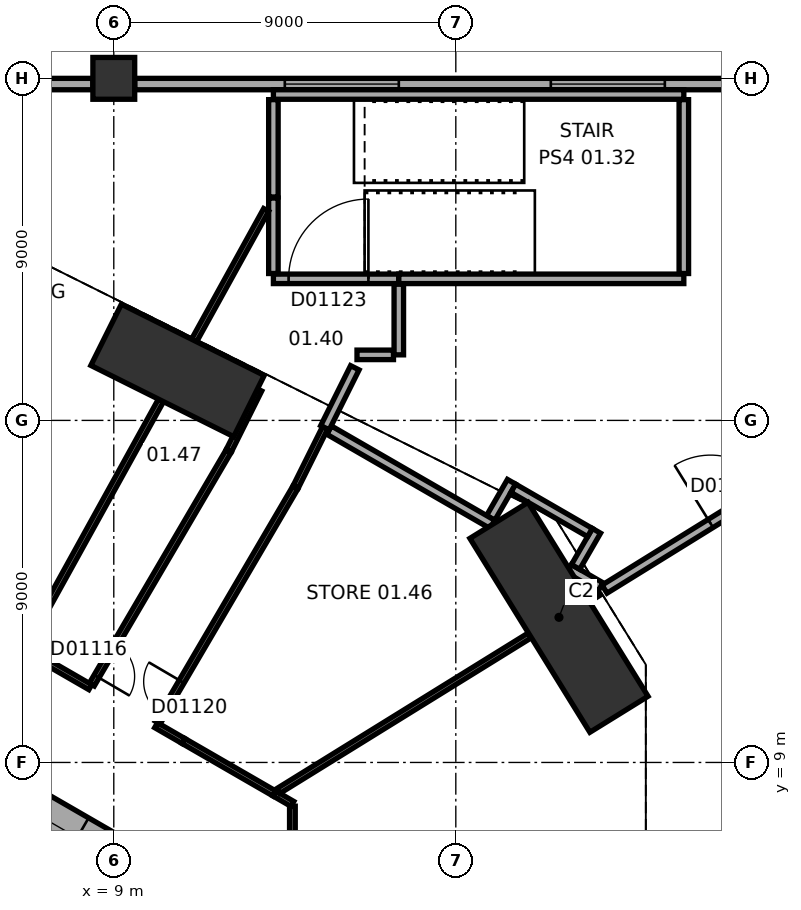
"""IFC4 building model, lengths in metres.
Left out: names, types, materials, properties, quantities, classifications, styles, units other than length and angle.
Written with IfcOpenShell. Run it as: python <this file> out.ifc"""

import sys

from ifc_helpers import new_model, si_unit, direction, frame, frame_2d, origin, origin_2d, place, context, subcontext, project, spatial, rectangle, extrude, element, fill, save


model = new_model("IFC4")
c1 = context("Model", 3, precision=1e-05, world=origin(), true_north=direction((0.0, 1.0)))
c2 = subcontext(c1, "Body", "Model", "MODEL_VIEW")
j1 = project(units=[si_unit("LENGTHUNIT", "METRE"), si_unit("PLANEANGLEUNIT", "RADIAN")], contexts=[c1])
p1 = place(None, origin())
s1 = spatial("IfcSite", under=j1, at=p1, CompositionType="ELEMENT")
p2 = place(p1, origin())
s2 = spatial("IfcBuilding", under=s1, at=p2, CompositionType="ELEMENT")
p3 = place(p2, frame((0.0, 0.0, 7.5)))
s3 = spatial("IfcBuildingStorey", under=s2, at=p3, CompositionType="ELEMENT", Elevation=7.5)
p4 = place(p3, frame((20.714, 12.818, 0.0), z_axis=(0.0, 0.0, 1.0), x_axis=(-0.526210955359, 0.850354061823, 0.0)))
e1 = element("IfcColumn", 1, at=p4, inside=s3, PredefinedType="COLUMN", context=c2, shape_type="SweptSolid", body=[
    extrude(rectangle(XDim=6.0, YDim=1.8, at=origin_2d()), origin(), (0.0, 0.0, 1.0), 5.5),
])
p5 = place(p3, frame((10.677, 19.315, 0.0), z_axis=(0.0, 0.0, 1.0), x_axis=(-0.894935140363, 0.446196251154, 0.0)))
e2 = element("IfcColumn", 2, at=p5, inside=s3, PredefinedType="COLUMN", context=c2, shape_type="SweptSolid", body=[
    extrude(rectangle(XDim=4.2, YDim=1.8, at=origin_2d()), origin(), (0.0, 0.0, 1.0), 5.5),
])
p6 = place(p3, frame((9.0, 27.0, 0.0), z_axis=(0.0, 0.0, 1.0), x_axis=(1.0, 0.0, 0.0)))
e3 = element("IfcColumn", 3, at=p6, inside=s3, PredefinedType="COLUMN", context=c2, shape_type="SweptSolid", body=[
    extrude(rectangle(XDim=1.1, YDim=1.1, at=origin_2d()), origin(), (0.0, 0.0, 1.0), 5.5),
])
p7 = place(p3, frame((10.4, 5.658, 0.0), z_axis=(0.0, 0.0, 1.0), x_axis=(-0.866021384402, 0.500006961711, 0.0)))
e4 = element("IfcWall", 4, at=p7, inside=s3, PredefinedType="SHEAR", context=c2, shape_type="SweptSolid", body=[
    extrude(rectangle(XDim=12.355, YDim=1.2, at=frame_2d((6.178, 0.0))), origin(), (0.0, 0.0, 1.0), 5.5),
])
p8 = place(p7, frame((2.728, 0.0, 0.0)))
e5 = element("IfcOpeningElement", 5, at=p8, cuts=e4, PredefinedType="OPENING", context=c2, shape_type="SweptSolid", body=[
    extrude(rectangle(XDim=1.1, YDim=2.1, at=frame_2d((0.55, 1.05))), frame((0.0, 0.61, 0.0), z_axis=(0.0, -1.0, 0.0), x_axis=(1.0, 0.0, 0.0)), (0.0, 0.0, 1.0), 1.22),
])
p9 = place(p7, frame((5.328, 0.0, 0.0)))
e6 = element("IfcOpeningElement", 6, at=p9, cuts=e4, PredefinedType="OPENING", context=c2, shape_type="SweptSolid", body=[
    extrude(rectangle(XDim=1.1, YDim=2.1, at=frame_2d((0.55, 1.05))), frame((0.0, 0.61, 0.0), z_axis=(0.0, -1.0, 0.0), x_axis=(1.0, 0.0, 0.0)), (0.0, 0.0, 1.0), 1.22),
])
p10 = place(p7, frame((7.928, 0.0, 0.0)))
e7 = element("IfcOpeningElement", 7, at=p10, cuts=e4, PredefinedType="OPENING", context=c2, shape_type="SweptSolid", body=[
    extrude(rectangle(XDim=1.1, YDim=2.1, at=frame_2d((0.55, 1.05))), frame((0.0, 0.61, 0.0), z_axis=(0.0, -1.0, 0.0), x_axis=(1.0, 0.0, 0.0)), (0.0, 0.0, 1.0), 1.22),
])
p11 = place(p3, frame((26.45, 26.85, 0.0), z_axis=(0.0, 0.0, 1.0), x_axis=(-1.0, 0.0, 0.0)))
e8 = element("IfcWall", 8, at=p11, inside=s3, PredefinedType="STANDARD", context=c2, shape_type="SweptSolid", body=[
    extrude(rectangle(XDim=16.9, YDim=0.3, at=frame_2d((8.45, 0.0))), origin(), (0.0, 0.0, 1.0), 4.0),
])
p12 = place(p11, frame((2.95, 0.0, 1.0)))
e9 = element("IfcOpeningElement", 9, at=p12, cuts=e8, PredefinedType="OPENING", context=c2, shape_type="SweptSolid", body=[
    extrude(rectangle(XDim=3.0, YDim=2.6, at=frame_2d((1.5, 1.3))), frame((0.0, 0.16, 0.0), z_axis=(0.0, -1.0, 0.0), x_axis=(1.0, 0.0, 0.0)), (0.0, 0.0, 1.0), 0.32),
])
p13 = place(p11, frame((9.95, 0.0, 1.0)))
e10 = element("IfcOpeningElement", 10, at=p13, cuts=e8, PredefinedType="OPENING", context=c2, shape_type="SweptSolid", body=[
    extrude(rectangle(XDim=3.0, YDim=2.6, at=frame_2d((1.5, 1.3))), frame((0.0, 0.16, 0.0), z_axis=(0.0, -1.0, 0.0), x_axis=(1.0, 0.0, 0.0)), (0.0, 0.0, 1.0), 0.32),
])
p14 = place(p3, frame((8.45, 26.85, 0.0), z_axis=(0.0, 0.0, 1.0), x_axis=(-1.0, 0.0, 0.0)))
e11 = element("IfcWall", 11, at=p14, inside=s3, PredefinedType="STANDARD", context=c2, shape_type="SweptSolid", body=[
    extrude(rectangle(XDim=16.9, YDim=0.3, at=frame_2d((8.45, 0.0))), origin(), (0.0, 0.0, 1.0), 4.0),
])
p15 = place(p14, frame((2.45, 0.0, 1.0)))
e12 = element("IfcOpeningElement", 12, at=p15, cuts=e11, PredefinedType="OPENING", context=c2, shape_type="SweptSolid", body=[
    extrude(rectangle(XDim=3.0, YDim=2.6, at=frame_2d((1.5, 1.3))), frame((0.0, 0.16, 0.0), z_axis=(0.0, -1.0, 0.0), x_axis=(1.0, 0.0, 0.0)), (0.0, 0.0, 1.0), 0.32),
])
p16 = place(p14, frame((11.45, 0.0, 1.0)))
e13 = element("IfcOpeningElement", 13, at=p16, cuts=e11, PredefinedType="OPENING", context=c2, shape_type="SweptSolid", body=[
    extrude(rectangle(XDim=3.0, YDim=2.6, at=frame_2d((1.5, 1.3))), frame((0.0, 0.16, 0.0), z_axis=(0.0, -1.0, 0.0), x_axis=(1.0, 0.0, 0.0)), (0.0, 0.0, 1.0), 0.32),
])
p17 = place(p3, frame((7.424, 4.259, 0.0), z_axis=(0.0, 0.0, 1.0), x_axis=(-0.866026010844, 0.49999894854, 0.0)))
e14 = element("IfcWall", 14, at=p17, inside=s3, PredefinedType="PARTITIONING", context=c2, shape_type="SweptSolid", body=[
    extrude(rectangle(XDim=8.0, YDim=0.2, at=frame_2d((4.0, 0.0))), origin(), (0.0, 0.0, 1.0), 5.2),
])
p18 = place(p3, frame((13.7, 7.85, 0.0), z_axis=(0.0, 0.0, 1.0), x_axis=(0.0, -1.0, 0.0)))
e15 = element("IfcWall", 15, at=p18, inside=s3, PredefinedType="PARTITIONING", context=c2, shape_type="SweptSolid", body=[
    extrude(rectangle(XDim=7.187, YDim=0.15, at=frame_2d((3.594, 0.0))), origin(), (0.0, 0.0, 1.0), 5.2),
])
p19 = place(p3, frame((13.7, 7.909, 0.0), z_axis=(0.0, 0.0, 1.0), x_axis=(-0.865629350875, 0.50068535719, 0.0)))
e16 = element("IfcWall", 16, at=p19, inside=s3, PredefinedType="PARTITIONING", context=c2, shape_type="SweptSolid", body=[
    extrude(rectangle(XDim=0.549, YDim=0.15, at=frame_2d((0.274, 0.0))), origin(), (0.0, 0.0, 1.0), 5.2),
])
p20 = place(p3, frame((10.833, 9.564, 0.0), z_axis=(0.0, 0.0, 1.0), x_axis=(0.866091368387, -0.499885728548, 0.0)))
e17 = element("IfcWall", 17, at=p20, inside=s3, PredefinedType="PARTITIONING", context=c2, shape_type="SweptSolid", body=[
    extrude(rectangle(XDim=2.761, YDim=0.15, at=frame_2d((1.381, 0.0))), origin(), (0.0, 0.0, 1.0), 5.2),
])
p21 = place(p3, frame((10.114, 9.98, 0.0), z_axis=(0.0, 0.0, 1.0), x_axis=(0.865848115047, -0.500306947453, 0.0)))
e18 = element("IfcWall", 18, at=p21, inside=s3, PredefinedType="PARTITIONING", context=c2, shape_type="SweptSolid", body=[
    extrude(rectangle(XDim=0.832, YDim=0.15, at=frame_2d((0.416, 0.0))), origin(), (0.0, 0.0, 1.0), 5.2),
])
p22 = place(p3, frame((8.422, 11.05, 0.0), z_axis=(0.0, 0.0, 1.0), x_axis=(0.50561651199, 0.862758333952, 0.0)))
e19 = element("IfcWall", 19, at=p22, inside=s3, PredefinedType="PARTITIONING", context=c2, shape_type="SweptSolid", body=[
    extrude(rectangle(XDim=7.118, YDim=0.15, at=frame_2d((3.559, 0.0))), origin(), (0.0, 0.0, 1.0), 4.4),
])
p23 = place(p22, frame((0.25, 0.0, 0.0)))
e20 = element("IfcOpeningElement", 20, at=p23, cuts=e19, PredefinedType="OPENING", context=c2, shape_type="SweptSolid", body=[
    extrude(rectangle(XDim=1.0, YDim=2.1, at=frame_2d((0.5, 1.05))), frame((0.0, 0.085, 0.0), z_axis=(0.0, -1.0, 0.0), x_axis=(1.0, 0.0, 0.0)), (0.0, 0.0, 1.0), 0.17),
])
p24 = place(p3, frame((6.995, 11.781, 0.0), z_axis=(0.0, 0.0, 1.0), x_axis=(0.866076391369, -0.499911676512, 0.0)))
e21 = element("IfcWall", 21, at=p24, inside=s3, PredefinedType="PARTITIONING", context=c2, shape_type="SweptSolid", body=[
    extrude(rectangle(XDim=1.601, YDim=0.15, at=frame_2d((0.8, 0.0))), origin(), (0.0, 0.0, 1.0), 5.2),
])
p25 = place(p3, frame((6.668, 12.062, 0.0), z_axis=(0.0, 0.0, 1.0), x_axis=(0.483795376692, 0.875181143245, 0.0)))
e22 = element("IfcWall", 22, at=p25, inside=s3, PredefinedType="PARTITIONING", context=c2, shape_type="SweptSolid", body=[
    extrude(rectangle(XDim=7.387, YDim=0.15, at=frame_2d((3.693, 0.0))), origin(), (0.0, 0.0, 1.0), 5.2),
])
p26 = place(p3, frame((19.949, 12.345, 0.0), z_axis=(0.0, 0.0, 1.0), x_axis=(-0.850341306025, -0.526231568102, 0.0)))
e23 = element("IfcWall", 23, at=p26, inside=s3, PredefinedType="PARTITIONING", context=c2, shape_type="SweptSolid", body=[
    extrude(rectangle(XDim=7.787, YDim=0.15, at=frame_2d((3.894, 0.0))), origin(), (0.0, 0.0, 1.0), 5.2),
])
p27 = place(p3, frame((21.756, 13.463, 0.0), z_axis=(0.0, 0.0, 1.0), x_axis=(-0.850441528835, -0.526069582881, 0.0)))
e24 = element("IfcWall", 24, at=p27, inside=s3, PredefinedType="PARTITIONING", context=c2, shape_type="SweptSolid", body=[
    extrude(rectangle(XDim=0.324, YDim=0.15, at=frame_2d((0.162, 0.0))), origin(), (0.0, 0.0, 1.0), 5.2),
])
p28 = place(p3, frame((21.913, 13.56, 0.0), z_axis=(0.0, 0.0, 1.0), x_axis=(0.850358193604, 0.526204278367, 0.0)))
e25 = element("IfcWall", 25, at=p28, inside=s3, PredefinedType="SOLIDWALL", context=c2, shape_type="SweptSolid", body=[
    extrude(rectangle(XDim=5.982, YDim=0.25, at=frame_2d((2.991, 0.0))), origin(), (0.0, 0.0, 1.0), 5.2),
])
p29 = place(p28, frame((3.282, 0.0, 0.0)))
e26 = element("IfcOpeningElement", 26, at=p29, cuts=e25, PredefinedType="OPENING", context=c2, shape_type="SweptSolid", body=[
    extrude(rectangle(XDim=1.8, YDim=2.4, at=frame_2d((0.9, 1.2))), frame((0.0, 0.135, 0.0), z_axis=(0.0, -1.0, 0.0), x_axis=(1.0, 0.0, 0.0)), (0.0, 0.0, 1.0), 0.27),
])
p30 = place(p3, frame((20.981, 14.098, 0.0), z_axis=(0.0, 0.0, 1.0), x_axis=(0.866019818373, -0.500009674092, 0.0)))
e27 = element("IfcWall", 27, at=p30, inside=s3, PredefinedType="SOLIDWALL", context=c2, shape_type="SweptSolid", body=[
    extrude(rectangle(XDim=0.957, YDim=0.25, at=frame_2d((0.478, 0.0))), origin(), (0.0, 0.0, 1.0), 5.2),
])
p31 = place(p3, frame((21.151, 14.144, 0.0), z_axis=(0.0, 0.0, 1.0), x_axis=(0.499940538003, 0.866059731463, 0.0)))
e28 = element("IfcWall", 28, at=p31, inside=s3, PredefinedType="SOLIDWALL", context=c2, shape_type="SweptSolid", body=[
    extrude(rectangle(XDim=1.098, YDim=0.25, at=frame_2d((0.549, 0.0))), origin(), (0.0, 0.0, 1.0), 5.2),
])
p32 = place(p3, frame((18.918, 15.434, 0.0), z_axis=(0.0, 0.0, 1.0), x_axis=(0.500036802197, 0.866004154983, 0.0)))
e29 = element("IfcWall", 29, at=p32, inside=s3, PredefinedType="SOLIDWALL", context=c2, shape_type="SweptSolid", body=[
    extrude(rectangle(XDim=1.098, YDim=0.25, at=frame_2d((0.549, 0.0))), origin(), (0.0, 0.0, 1.0), 5.2),
])
p33 = place(p3, frame((19.513, 16.214, 0.0), z_axis=(0.0, 0.0, 1.0), x_axis=(0.865983097198, -0.500073269999, 0.0)))
e30 = element("IfcWall", 30, at=p33, inside=s3, PredefinedType="SOLIDWALL", context=c2, shape_type="SweptSolid", body=[
    extrude(rectangle(XDim=2.329, YDim=0.25, at=frame_2d((1.165, 0.0))), origin(), (0.0, 0.0, 1.0), 5.2),
])
p34 = place(p3, frame((13.772, 16.224, 0.0), z_axis=(0.0, 0.0, 1.0), x_axis=(-0.505547889018, -0.862798546539, 0.0)))
e31 = element("IfcWall", 31, at=p34, inside=s3, PredefinedType="PARTITIONING", context=c2, shape_type="SweptSolid", body=[
    extrude(rectangle(XDim=7.156, YDim=0.15, at=frame_2d((3.578, 0.0))), origin(), (0.0, 0.0, 1.0), 5.2),
])
p35 = place(p34, frame((5.906, 0.0, 0.0)))
e32 = element("IfcOpeningElement", 32, at=p35, cuts=e31, PredefinedType="OPENING", context=c2, shape_type="SweptSolid", body=[
    extrude(rectangle(XDim=1.0, YDim=2.1, at=frame_2d((0.5, 1.05))), frame((0.0, 0.085, 0.0), z_axis=(0.0, -1.0, 0.0), x_axis=(1.0, 0.0, 0.0)), (0.0, 0.0, 1.0), 0.17),
])
p36 = place(p3, frame((14.665, 17.745, 0.0), z_axis=(0.0, 0.0, 1.0), x_axis=(0.865991457592, -0.50005879192, 0.0)))
e33 = element("IfcWall", 33, at=p36, inside=s3, PredefinedType="SOLIDWALL", context=c2, shape_type="SweptSolid", body=[
    extrude(rectangle(XDim=4.964, YDim=0.25, at=frame_2d((2.482, 0.0))), origin(), (0.0, 0.0, 1.0), 3.7),
])
p37 = place(p3, frame((14.56, 17.803, 0.0), z_axis=(0.0, 0.0, 1.0), x_axis=(-0.44574598187, -0.895159493971, 0.0)))
e34 = element("IfcWall", 34, at=p37, inside=s3, PredefinedType="PARTITIONING", context=c2, shape_type="SweptSolid", body=[
    extrude(rectangle(XDim=1.731, YDim=0.15, at=frame_2d((0.865, 0.0))), origin(), (0.0, 0.0, 1.0), 5.2),
])
p38 = place(p3, frame((14.556, 17.807, 0.0), z_axis=(0.0, 0.0, 1.0), x_axis=(0.446105260408, 0.894980500701, 0.0)))
e35 = element("IfcWall", 35, at=p38, inside=s3, PredefinedType="SOLIDWALL", context=c2, shape_type="SweptSolid", body=[
    extrude(rectangle(XDim=1.763, YDim=0.25, at=frame_2d((0.881, 0.0))), origin(), (0.0, 0.0, 1.0), 5.2),
])
p39 = place(p3, frame((12.825, 18.807, 0.0), z_axis=(0.0, 0.0, 1.0), x_axis=(-0.445626254489, -0.895219102404, 0.0)))
e36 = element("IfcWall", 36, at=p39, inside=s3, PredefinedType="PARTITIONING", context=c2, shape_type="SweptSolid", body=[
    extrude(rectangle(XDim=1.785, YDim=0.15, at=frame_2d((0.893, 0.0))), origin(), (0.0, 0.0, 1.0), 5.2),
])
p40 = place(p3, frame((16.36, 19.725, 0.0), z_axis=(0.0, 0.0, 1.0), x_axis=(-1.0, 0.0, 0.0)))
e37 = element("IfcWall", 37, at=p40, inside=s3, PredefinedType="SOLIDWALL", context=c2, shape_type="SweptSolid", body=[
    extrude(rectangle(XDim=0.96, YDim=0.25, at=frame_2d((0.48, 0.0))), origin(), (0.0, 0.0, 1.0), 5.2),
])
p41 = place(p3, frame((16.5, 21.585, 0.0), z_axis=(0.0, 0.0, 1.0), x_axis=(0.0, -1.0, 0.0)))
e38 = element("IfcWall", 38, at=p41, inside=s3, PredefinedType="SOLIDWALL", context=c2, shape_type="SweptSolid", body=[
    extrude(rectangle(XDim=1.86, YDim=0.25, at=frame_2d((0.93, 0.0))), origin(), (0.0, 0.0, 1.0), 5.2),
])
p42 = place(p3, frame((16.499, 21.725, 0.0), z_axis=(0.0, 0.0, 1.0), x_axis=(-1.0, 0.0, 0.0)))
e39 = element("IfcWall", 39, at=p42, inside=s3, PredefinedType="SOLIDWALL", context=c2, shape_type="SweptSolid", body=[
    extrude(rectangle(XDim=3.299, YDim=0.25, at=frame_2d((1.649, 0.0))), origin(), (0.0, 0.0, 1.0), 5.2),
])
p43 = place(p42, frame((0.799, 0.0, 0.0)))
e40 = element("IfcOpeningElement", 40, at=p43, cuts=e39, PredefinedType="OPENING", context=c2, shape_type="SweptSolid", body=[
    extrude(rectangle(XDim=2.1, YDim=2.4, at=frame_2d((1.05, 1.2))), frame((0.0, 0.135, 0.0), z_axis=(0.0, -1.0, 0.0), x_axis=(1.0, 0.0, 0.0)), (0.0, 0.0, 1.0), 0.27),
])
p44 = place(p3, frame((24.0, 21.725, 0.0), z_axis=(0.0, 0.0, 1.0), x_axis=(-1.0, 0.0, 0.0)))
e41 = element("IfcWall", 41, at=p44, inside=s3, PredefinedType="SOLIDWALL", context=c2, shape_type="SweptSolid", body=[
    extrude(rectangle(XDim=7.5, YDim=0.25, at=frame_2d((3.75, 0.0))), origin(), (0.0, 0.0, 1.0), 5.2),
])
p45 = place(p3, frame((13.2, 21.865, 0.0), z_axis=(0.0, 0.0, 1.0), x_axis=(0.0, 1.0, 0.0)))
e42 = element("IfcWall", 42, at=p45, inside=s3, PredefinedType="SOLIDWALL", context=c2, shape_type="SweptSolid", body=[
    extrude(rectangle(XDim=1.986, YDim=0.25, at=frame_2d((0.993, 0.0))), origin(), (0.0, 0.0, 1.0), 5.2),
])
p46 = place(p3, frame((13.01, 23.538, 0.0), z_axis=(0.0, 0.0, 1.0), x_axis=(-0.483449030978, -0.875372511818, 0.0)))
e43 = element("IfcWall", 43, at=p46, inside=s3, PredefinedType="PARTITIONING", context=c2, shape_type="SweptSolid", body=[
    extrude(rectangle(XDim=3.924, YDim=0.15, at=frame_2d((1.962, 0.0))), origin(), (0.0, 0.0, 1.0), 5.2),
])
p47 = place(p3, frame((13.2, 23.878, 0.0), z_axis=(0.0, 0.0, 1.0), x_axis=(0.0, 1.0, 0.0)))
e44 = element("IfcWall", 44, at=p47, inside=s3, PredefinedType="SOLIDWALL", context=c2, shape_type="SweptSolid", body=[
    extrude(rectangle(XDim=2.562, YDim=0.25, at=frame_2d((1.281, 0.0))), origin(), (0.0, 0.0, 1.0), 5.2),
])
p48 = place(p3, frame((24.0, 26.44, 0.0), z_axis=(0.0, 0.0, 1.0), x_axis=(0.0, -1.0, 0.0)))
e45 = element("IfcWall", 45, at=p48, inside=s3, PredefinedType="SOLIDWALL", context=c2, shape_type="SweptSolid", body=[
    extrude(rectangle(XDim=4.575, YDim=0.25, at=frame_2d((2.288, 0.0))), origin(), (0.0, 0.0, 1.0), 5.2),
])
p49 = place(p3, frame((24.0, 26.575, 0.0), z_axis=(0.0, 0.0, 1.0), x_axis=(-1.0, 0.0, 0.0)))
e46 = element("IfcWall", 46, at=p49, inside=s3, PredefinedType="SOLIDWALL", context=c2, shape_type="SweptSolid", body=[
    extrude(rectangle(XDim=10.8, YDim=0.25, at=frame_2d((5.4, 0.0))), origin(), (0.0, 0.0, 1.0), 5.2),
])
p50 = place(p12, origin())
e47 = element("IfcWindow", 47, at=p50, inside=s3, PartitioningType="SINGLE_PANEL", PredefinedType="WINDOW", context=c2, shape_type="SweptSolid", body=[
    extrude(rectangle(XDim=3.0, YDim=2.6, at=frame_2d((1.5, 1.3))), frame((0.0, 0.03, 0.0), z_axis=(0.0, -1.0, 0.0), x_axis=(1.0, 0.0, 0.0)), (0.0, 0.0, 1.0), 0.06),
])
fill(e9, e47)
p51 = place(p13, origin())
e48 = element("IfcWindow", 48, at=p51, inside=s3, PartitioningType="SINGLE_PANEL", PredefinedType="WINDOW", context=c2, shape_type="SweptSolid", body=[
    extrude(rectangle(XDim=3.0, YDim=2.6, at=frame_2d((1.5, 1.3))), frame((0.0, 0.03, 0.0), z_axis=(0.0, -1.0, 0.0), x_axis=(1.0, 0.0, 0.0)), (0.0, 0.0, 1.0), 0.06),
])
fill(e10, e48)
p52 = place(p8, origin())
e49 = element("IfcDoor", 49, at=p52, inside=s3, OperationType="DOUBLE_DOOR_SLIDING", PredefinedType="DOOR", context=c2, shape_type="SweptSolid", body=[
    extrude(rectangle(XDim=1.1, YDim=2.1, at=frame_2d((0.55, 1.05))), frame((0.0, 0.025, 0.0), z_axis=(0.0, -1.0, 0.0), x_axis=(1.0, 0.0, 0.0)), (0.0, 0.0, 1.0), 0.05),
])
fill(e5, e49)
p53 = place(p23, origin())
e50 = element("IfcDoor", 50, at=p53, inside=s3, OperationType="SINGLE_SWING_LEFT", PredefinedType="DOOR", context=c2, shape_type="SweptSolid", body=[
    extrude(rectangle(XDim=1.0, YDim=2.1, at=frame_2d((0.5, 1.05))), frame((0.0, 0.025, 0.0), z_axis=(0.0, -1.0, 0.0), x_axis=(1.0, 0.0, 0.0)), (0.0, 0.0, 1.0), 0.05),
])
fill(e20, e50)
p54 = place(p29, origin())
e51 = element("IfcDoor", 51, at=p54, inside=s3, OperationType="DOUBLE_DOOR_SINGLE_SWING", PredefinedType="DOOR", context=c2, shape_type="SweptSolid", body=[
    extrude(rectangle(XDim=1.8, YDim=2.4, at=frame_2d((0.9, 1.2))), frame((0.0, 0.025, 0.0), z_axis=(0.0, -1.0, 0.0), x_axis=(1.0, 0.0, 0.0)), (0.0, 0.0, 1.0), 0.05),
])
fill(e26, e51)
p55 = place(p35, origin())
e52 = element("IfcDoor", 52, at=p55, inside=s3, OperationType="SINGLE_SWING_LEFT", PredefinedType="DOOR", context=c2, shape_type="SweptSolid", body=[
    extrude(rectangle(XDim=1.0, YDim=2.1, at=frame_2d((0.5, 1.05))), frame((0.0, 0.025, 0.0), z_axis=(0.0, -1.0, 0.0), x_axis=(1.0, 0.0, 0.0)), (0.0, 0.0, 1.0), 0.05),
])
fill(e32, e52)
p56 = place(p43, frame((2.1, 0.0, 0.0), z_axis=(0.0, 0.0, 1.0), x_axis=(-1.0, 0.0, 0.0)))
e53 = element("IfcDoor", 53, at=p56, inside=s3, OperationType="DOUBLE_DOOR_SINGLE_SWING", PredefinedType="DOOR", context=c2, shape_type="SweptSolid", body=[
    extrude(rectangle(XDim=2.1, YDim=2.4, at=frame_2d((1.05, 1.2))), frame((0.0, 0.025, 0.0), z_axis=(0.0, -1.0, 0.0), x_axis=(1.0, 0.0, 0.0)), (0.0, 0.0, 1.0), 0.05),
])
fill(e40, e53)
save(model, sys.argv[1])
